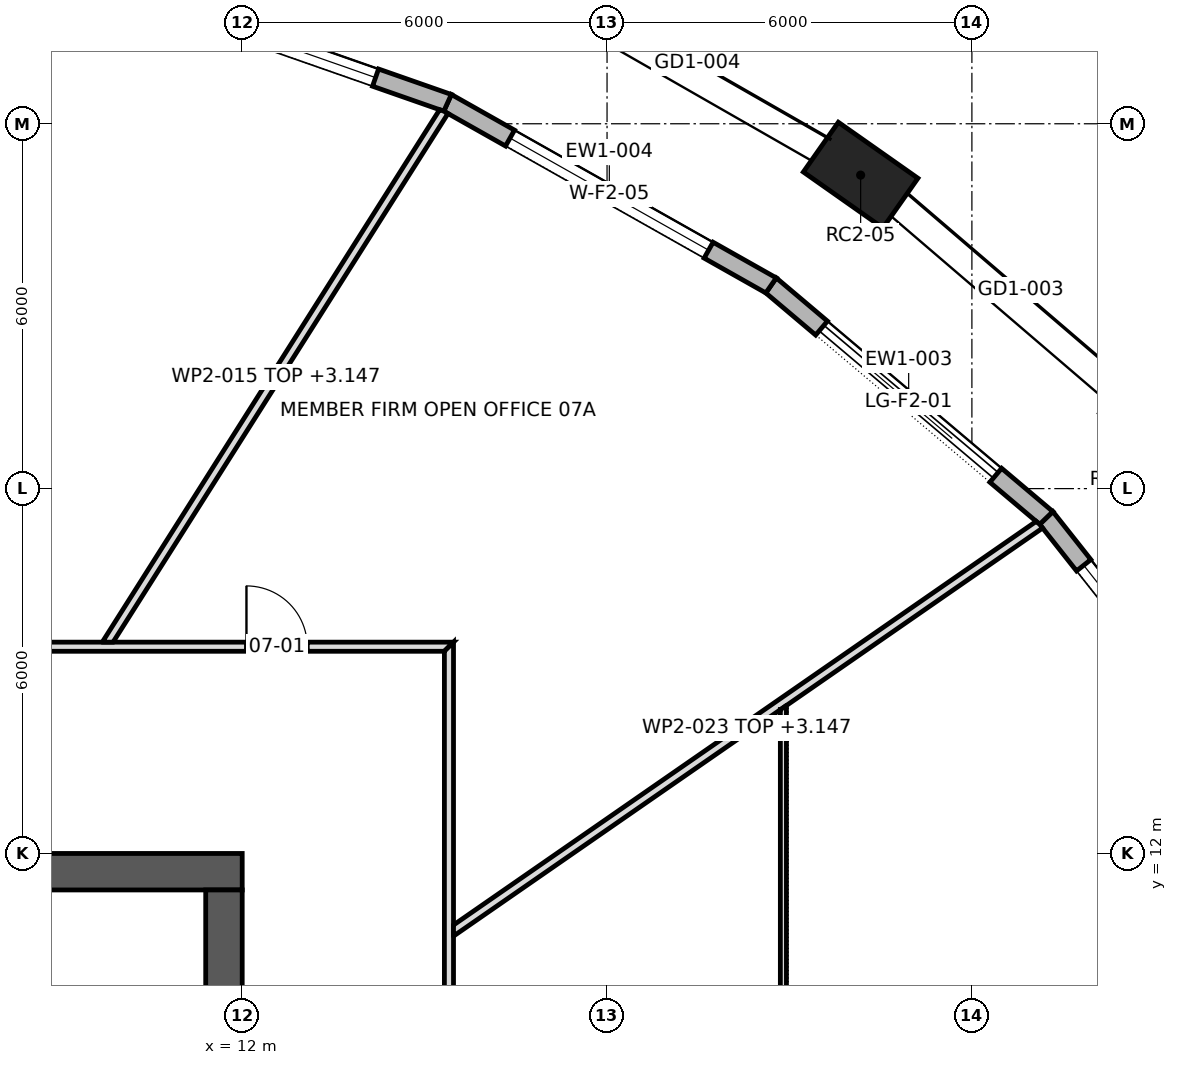
"""IFC4 building model, lengths in metres.
Left out: names, types, materials, properties, quantities, classifications, styles, units other than length and angle.
Written with IfcOpenShell. Run it as: python <this file> out.ifc"""

import sys

from ifc_helpers import new_model, si_unit, direction, frame, frame_2d, origin, origin_2d, place, context, subcontext, project, spatial, polyline, rectangle, outline, extrude, element, fill, save


model = new_model("IFC4")
c1 = context("Model", 3, precision=1e-05, world=origin(), true_north=direction((0.0, 1.0)))
c2 = subcontext(c1, "Body", "Model", "MODEL_VIEW")
j1 = project(units=[si_unit("LENGTHUNIT", "METRE"), si_unit("PLANEANGLEUNIT", "RADIAN")], contexts=[c1])
p1 = place(None, origin())
s1 = spatial("IfcSite", under=j1, at=p1, CompositionType="ELEMENT")
p2 = place(p1, origin())
s2 = spatial("IfcBuilding", under=s1, at=p2, CompositionType="ELEMENT")
p3 = place(p2, frame((0.0, 0.0, 112.9)))
s3 = spatial("IfcBuildingStorey", under=s2, at=p3, CompositionType="ELEMENT", Elevation=112.9)
p4 = place(p3, frame((22.17, 23.156, 0.0), z_axis=(0.0, 0.0, 1.0), x_axis=(-0.817906779671, 0.575350762377, 0.0)))
e1 = element("IfcColumn", 1, at=p4, inside=s3, PredefinedType="COLUMN", context=c2, shape_type="SweptSolid", body=[
    extrude(rectangle(XDim=1.6, YDim=1.0, at=origin_2d()), origin(), (0.0, 0.0, 1.0), 4.2),
])
p5 = place(p3, frame((-12.0, 11.7, 0.0), z_axis=(0.0, 0.0, 1.0), x_axis=(1.0, 0.0, 0.0)))
e2 = element("IfcWall", 2, at=p5, inside=s3, PredefinedType="SHEAR", context=c2, shape_type="SweptSolid", body=[
    extrude(rectangle(XDim=24.0, YDim=0.6, at=frame_2d((12.0, 0.0))), origin(), (0.0, 0.0, 1.0), 4.2),
])
p6 = place(p5, frame((9.975, 0.0, 0.0)))
e3 = element("IfcOpeningElement", 3, at=p6, cuts=e2, PredefinedType="OPENING", context=c2, shape_type="SweptSolid", body=[
    extrude(rectangle(XDim=0.9, YDim=2.1, at=frame_2d((0.45, 1.05))), frame((0.0, 0.312, 0.0), z_axis=(0.0, -1.0, 0.0), x_axis=(1.0, 0.0, 0.0)), (0.0, 0.0, 1.0), 0.624),
])
p7 = place(p5, frame((3.6, 0.0, 0.0)))
e4 = element("IfcOpeningElement", 4, at=p7, cuts=e2, PredefinedType="OPENING", context=c2, shape_type="SweptSolid", body=[
    extrude(rectangle(XDim=0.8, YDim=2.1, at=frame_2d((0.4, 1.05))), frame((0.0, 0.312, 0.0), z_axis=(0.0, -1.0, 0.0), x_axis=(1.0, 0.0, 0.0)), (0.0, 0.0, 1.0), 0.624),
])
p8 = place(p5, frame((6.2, 0.0, 0.0)))
e5 = element("IfcOpeningElement", 5, at=p8, cuts=e2, PredefinedType="OPENING", context=c2, shape_type="SweptSolid", body=[
    extrude(rectangle(XDim=0.8, YDim=2.1, at=frame_2d((0.4, 1.05))), frame((0.0, 0.312, 0.0), z_axis=(0.0, -1.0, 0.0), x_axis=(1.0, 0.0, 0.0)), (0.0, 0.0, 1.0), 0.624),
])
p9 = place(p5, frame((15.85, 0.0, 0.0)))
e6 = element("IfcOpeningElement", 6, at=p9, cuts=e2, PredefinedType="OPENING", context=c2, shape_type="SweptSolid", body=[
    extrude(rectangle(XDim=0.8, YDim=2.1, at=frame_2d((0.4, 1.05))), frame((0.0, 0.312, 0.0), z_axis=(0.0, -1.0, 0.0), x_axis=(1.0, 0.0, 0.0)), (0.0, 0.0, 1.0), 0.624),
])
p10 = place(p3, frame((11.7, -11.4, 0.0), z_axis=(0.0, 0.0, 1.0), x_axis=(0.0, 1.0, 0.0)))
e7 = element("IfcWall", 7, at=p10, inside=s3, PredefinedType="SHEAR", context=c2, shape_type="SweptSolid", body=[
    extrude(rectangle(XDim=22.8, YDim=0.6, at=frame_2d((11.4, 0.0))), origin(), (0.0, 0.0, 1.0), 4.2),
])
p11 = place(p10, frame((10.2, 0.0, 0.0)))
e8 = element("IfcOpeningElement", 8, at=p11, cuts=e7, PredefinedType="OPENING", context=c2, shape_type="SweptSolid", body=[
    extrude(rectangle(XDim=2.4, YDim=2.1, at=frame_2d((1.2, 1.05))), frame((0.0, 0.312, 0.0), z_axis=(0.0, -1.0, 0.0), x_axis=(1.0, 0.0, 0.0)), (0.0, 0.0, 1.0), 0.624),
])
p12 = place(p10, frame((19.5, 0.0, 0.0)))
e9 = element("IfcOpeningElement", 9, at=p12, cuts=e7, PredefinedType="OPENING", context=c2, shape_type="SweptSolid", body=[
    extrude(rectangle(XDim=1.2, YDim=2.1, at=frame_2d((0.6, 1.05))), frame((0.0, 0.312, 0.0), z_axis=(0.0, -1.0, 0.0), x_axis=(1.0, 0.0, 0.0)), (0.0, 0.0, 1.0), 0.624),
])
p13 = place(p10, frame((2.1, 0.0, 0.0)))
e10 = element("IfcOpeningElement", 10, at=p13, cuts=e7, PredefinedType="OPENING", context=c2, shape_type="SweptSolid", body=[
    extrude(rectangle(XDim=1.2, YDim=2.1, at=frame_2d((0.6, 1.05))), frame((0.0, 0.312, 0.0), z_axis=(0.0, -1.0, 0.0), x_axis=(1.0, 0.0, 0.0)), (0.0, 0.0, 1.0), 0.624),
])
p14 = place(p3, frame((28.781, 13.019, 0.0), z_axis=(0.0, 0.0, 1.0), x_axis=(-0.620329992039, 0.784340934146, 0.0)))
e11 = element("IfcWall", 11, at=p14, inside=s3, PredefinedType="STANDARD", context=c2, shape_type="SweptSolid", body=[
    extrude(outline(polyline([(-0.016, -0.15), (5.75, -0.15), (5.72, 0.15), (0.016, 0.15), (-0.016, -0.15)])), origin(), (0.0, 0.0, 1.0), 3.9),
])
p15 = place(p14, frame((0.993, 0.0, 0.6)))
e12 = element("IfcOpeningElement", 12, at=p15, cuts=e11, PredefinedType="OPENING", context=c2, shape_type="SweptSolid", body=[
    extrude(rectangle(XDim=3.75, YDim=2.85, at=frame_2d((1.875, 1.425))), frame((0.0, 0.162, 0.0), z_axis=(0.0, -1.0, 0.0), x_axis=(1.0, 0.0, 0.0)), (0.0, 0.0, 1.0), 0.324),
])
p16 = place(p3, frame((25.223, 17.518, 0.0), z_axis=(0.0, 0.0, 1.0), x_axis=(-0.763894031266, 0.645341699409, 0.0)))
e13 = element("IfcWall", 13, at=p16, inside=s3, PredefinedType="STANDARD", context=c2, shape_type="SweptSolid", body=[
    extrude(outline(polyline([(-0.015, -0.15), (5.939, -0.15), (5.911, 0.15), (0.015, 0.15), (-0.015, -0.15)])), origin(), (0.0, 0.0, 1.0), 3.9),
])
p17 = place(p16, frame((1.087, 0.0, 0.0)))
e14 = element("IfcOpeningElement", 14, at=p17, cuts=e13, PredefinedType="OPENING", context=c2, shape_type="SweptSolid", body=[
    extrude(rectangle(XDim=3.75, YDim=3.45, at=frame_2d((1.875, 1.725))), frame((0.0, 0.162, 0.0), z_axis=(0.0, -1.0, 0.0), x_axis=(1.0, 0.0, 0.0)), (0.0, 0.0, 1.0), 0.324),
])
p18 = place(p3, frame((20.697, 21.341, 0.0), z_axis=(0.0, 0.0, 1.0), x_axis=(-0.870828448417, 0.491587035455, 0.0)))
e15 = element("IfcWall", 15, at=p18, inside=s3, PredefinedType="STANDARD", context=c2, shape_type="SweptSolid", body=[
    extrude(outline(polyline([(-0.014, -0.15), (6.122, -0.15), (6.095, 0.15), (0.014, 0.15), (-0.014, -0.15)])), origin(), (0.0, 0.0, 1.0), 3.9),
])
p19 = place(p18, frame((1.179, 0.0, 0.6)))
e16 = element("IfcOpeningElement", 16, at=p19, cuts=e15, PredefinedType="OPENING", context=c2, shape_type="SweptSolid", body=[
    extrude(rectangle(XDim=3.75, YDim=2.85, at=frame_2d((1.875, 1.425))), frame((0.0, 0.162, 0.0), z_axis=(0.0, -1.0, 0.0), x_axis=(1.0, 0.0, 0.0)), (0.0, 0.0, 1.0), 0.324),
])
p20 = place(p3, frame((15.377, 24.344, 0.0), z_axis=(0.0, 0.0, 1.0), x_axis=(-0.943866868202, 0.330326104193, 0.0)))
e17 = element("IfcWall", 17, at=p20, inside=s3, PredefinedType="STANDARD", context=c2, shape_type="SweptSolid", body=[
    extrude(outline(polyline([(-0.013, -0.15), (6.273, -0.15), (6.247, 0.15), (0.013, 0.15), (-0.013, -0.15)])), origin(), (0.0, 0.0, 1.0), 3.9),
])
p21 = place(p20, frame((1.255, 0.0, 0.6)))
e18 = element("IfcOpeningElement", 18, at=p21, cuts=e17, PredefinedType="OPENING", context=c2, shape_type="SweptSolid", body=[
    extrude(rectangle(XDim=3.75, YDim=2.85, at=frame_2d((1.875, 1.425))), frame((0.0, 0.162, 0.0), z_axis=(0.0, -1.0, 0.0), x_axis=(1.0, 0.0, 0.0)), (0.0, 0.0, 1.0), 0.324),
])
p22 = place(p3, frame((-15.475, 15.4, 0.0), z_axis=(0.0, 0.0, 1.0), x_axis=(1.0, 0.0, 0.0)))
e19 = element("IfcWall", 19, at=p22, inside=s3, PredefinedType="PARTITIONING", context=c2, shape_type="SweptSolid", body=[
    extrude(outline(polyline([(0.15, -0.075), (2.066, -0.075), (3.981, -0.075), (5.897, -0.075), (7.812, -0.075), (9.728, -0.075), (11.644, -0.075), (13.56, -0.075), (15.475, -0.075), (17.391, -0.075), (19.306, -0.075), (21.222, -0.075), (23.138, -0.075), (25.053, -0.075), (26.969, -0.075), (28.885, -0.075), (30.8, -0.075), (30.95, 0.075), (29.016, 0.075), (27.081, 0.075), (25.147, 0.075), (23.212, 0.075), (21.278, 0.075), (19.344, 0.075), (17.409, 0.075), (15.475, 0.075), (13.541, 0.075), (11.606, 0.075), (9.672, 0.075), (7.738, 0.075), (5.803, 0.075), (3.869, 0.075), (1.935, 0.075), (0.0, 0.075), (0.15, -0.075)])), origin(), (0.0, 0.0, 1.0), 3.9),
])
p23 = place(p22, frame((27.545, 0.0, 0.0)))
e20 = element("IfcOpeningElement", 20, at=p23, cuts=e19, PredefinedType="OPENING", context=c2, shape_type="SweptSolid", body=[
    extrude(rectangle(XDim=1.0, YDim=2.1, at=frame_2d((0.5, 1.05))), frame((0.0, 0.087, 0.0), z_axis=(0.0, -1.0, 0.0), x_axis=(1.0, 0.0, 0.0)), (0.0, 0.0, 1.0), 0.174),
])
p24 = place(p22, frame((18.545, 0.0, 0.0)))
e21 = element("IfcOpeningElement", 21, at=p24, cuts=e19, PredefinedType="OPENING", context=c2, shape_type="SweptSolid", body=[
    extrude(rectangle(XDim=1.8, YDim=2.1, at=frame_2d((0.9, 1.05))), frame((0.0, 0.087, 0.0), z_axis=(0.0, -1.0, 0.0), x_axis=(1.0, 0.0, 0.0)), (0.0, 0.0, 1.0), 0.174),
])
p25 = place(p22, frame((6.195, 0.0, 0.0)))
e22 = element("IfcOpeningElement", 22, at=p25, cuts=e19, PredefinedType="OPENING", context=c2, shape_type="SweptSolid", body=[
    extrude(rectangle(XDim=1.8, YDim=2.1, at=frame_2d((0.9, 1.05))), frame((0.0, 0.087, 0.0), z_axis=(0.0, -1.0, 0.0), x_axis=(1.0, 0.0, 0.0)), (0.0, 0.0, 1.0), 0.174),
])
p26 = place(p3, frame((9.762, 15.435, 0.0), z_axis=(0.0, 0.0, 1.0), x_axis=(0.535189090909, 0.844732287161, 0.0)))
e23 = element("IfcWall", 23, at=p26, inside=s3, PredefinedType="PARTITIONING", context=c2, shape_type="SweptSolid", body=[
    extrude(outline(polyline([(10.386, -0.075), (10.386, -0.069), (10.382, 0.004), (10.365, 0.075), (8.638, 0.075), (6.91, 0.075), (5.183, 0.075), (3.455, 0.075), (1.728, 0.075), (0.0, 0.075), (0.0, 0.075), (0.095, -0.075), (1.81, -0.075), (3.525, -0.075), (5.24, -0.075), (6.955, -0.075), (8.671, -0.075), (10.386, -0.075)])), origin(), (0.0, 0.0, 1.0), 3.147),
])
p27 = place(p3, frame((15.4, 2.88, 0.0), z_axis=(0.0, 0.0, 1.0), x_axis=(0.0, 1.0, 0.0)))
e24 = element("IfcWall", 24, at=p27, inside=s3, PredefinedType="PARTITIONING", context=c2, shape_type="SweptSolid", body=[
    extrude(outline(polyline([(0.0, -0.075), (1.799, -0.075), (3.599, -0.075), (5.398, -0.075), (7.197, -0.075), (8.996, -0.075), (10.796, -0.075), (12.595, -0.075), (12.445, 0.075), (10.667, 0.075), (8.889, 0.075), (7.112, 0.075), (5.333, 0.075), (3.556, 0.075), (1.778, 0.075), (0.0, 0.075), (0.0, -0.075)])), origin(), (0.0, 0.0, 1.0), 3.9),
])
p28 = place(p27, frame((3.4, 0.0, 0.0)))
e25 = element("IfcOpeningElement", 25, at=p28, cuts=e24, PredefinedType="OPENING", context=c2, shape_type="SweptSolid", body=[
    extrude(rectangle(XDim=1.0, YDim=2.1, at=frame_2d((0.5, 1.05))), frame((0.0, 0.087, 0.0), z_axis=(0.0, -1.0, 0.0), x_axis=(1.0, 0.0, 0.0)), (0.0, 0.0, 1.0), 0.174),
])
p29 = place(p3, frame((15.433, 10.702, 0.0), z_axis=(0.0, 0.0, 1.0), x_axis=(0.82202509952, 0.569451258458, 0.0)))
e26 = element("IfcWall", 26, at=p29, inside=s3, PredefinedType="PARTITIONING", context=c2, shape_type="SweptSolid", body=[
    extrude(outline(polyline([(0.0, -0.075), (1.635, -0.075), (3.269, -0.075), (4.904, -0.075), (6.538, -0.075), (6.54, -0.072), (6.544, -0.075), (8.291, -0.075), (10.038, -0.075), (11.785, -0.075), (11.785, -0.071), (11.78, 0.003), (11.761, 0.075), (9.818, 0.075), (7.875, 0.075), (5.932, 0.075), (3.989, 0.075), (2.046, 0.075), (0.104, 0.075), (0.0, -0.074), (0.0, -0.075)])), origin(), (0.0, 0.0, 1.0), 3.147),
])
p30 = place(p3, frame((20.9, -1.668, 0.0), z_axis=(0.0, 0.0, 1.0), x_axis=(0.0, 1.0, 0.0)))
e27 = element("IfcWall", 27, at=p30, inside=s3, PredefinedType="PARTITIONING", context=c2, shape_type="SweptSolid", body=[
    extrude(outline(polyline([(16.102, -0.05), (16.102, -0.05), (16.032, 0.05), (14.127, 0.05), (12.221, 0.05), (10.315, 0.05), (8.41, 0.05), (6.504, 0.05), (4.598, 0.05), (4.598, 0.05), (4.499, 0.05), (4.499, 0.05), (3.002, 0.05), (1.505, 0.05), (0.008, 0.05), (0.0, -0.049), (0.0, -0.05), (1.789, -0.05), (3.578, -0.05), (5.367, -0.05), (7.156, -0.05), (8.945, -0.05), (10.734, -0.05), (12.523, -0.05), (14.312, -0.05), (16.102, -0.05)])), origin(), (0.0, 0.0, 1.0), 3.9),
])
p31 = place(p30, frame((9.904, 0.0, 0.0)))
e28 = element("IfcOpeningElement", 28, at=p31, cuts=e27, PredefinedType="OPENING", context=c2, shape_type="SweptSolid", body=[
    extrude(rectangle(XDim=0.9, YDim=2.1, at=frame_2d((0.45, 1.05))), frame((0.0, 0.062, 0.0), z_axis=(0.0, -1.0, 0.0), x_axis=(1.0, 0.0, 0.0)), (0.0, 0.0, 1.0), 0.124),
])
p32 = place(p15, origin())
e29 = element("IfcWindow", 29, at=p32, inside=s3, PartitioningType="TRIPLE_PANEL_VERTICAL", PredefinedType="WINDOW", context=c2, shape_type="SweptSolid", body=[
    extrude(rectangle(XDim=3.75, YDim=2.85, at=frame_2d((1.875, 1.425))), frame((0.0, 0.03, 0.0), z_axis=(0.0, -1.0, 0.0), x_axis=(1.0, 0.0, 0.0)), (0.0, 0.0, 1.0), 0.06),
])
fill(e12, e29)
p33 = place(p17, origin())
e30 = element("IfcDoor", 30, at=p33, inside=s3, OperationType="DOUBLE_DOOR_SLIDING", PredefinedType="DOOR", context=c2, shape_type="SweptSolid", body=[
    extrude(rectangle(XDim=3.75, YDim=3.45, at=frame_2d((1.875, 1.725))), frame((0.0, 0.025, 0.0), z_axis=(0.0, -1.0, 0.0), x_axis=(1.0, 0.0, 0.0)), (0.0, 0.0, 1.0), 0.05),
])
fill(e14, e30)
p34 = place(p19, origin())
e31 = element("IfcWindow", 31, at=p34, inside=s3, PartitioningType="TRIPLE_PANEL_VERTICAL", PredefinedType="WINDOW", context=c2, shape_type="SweptSolid", body=[
    extrude(rectangle(XDim=3.75, YDim=2.85, at=frame_2d((1.875, 1.425))), frame((0.0, 0.03, 0.0), z_axis=(0.0, -1.0, 0.0), x_axis=(1.0, 0.0, 0.0)), (0.0, 0.0, 1.0), 0.06),
])
fill(e16, e31)
p35 = place(p21, origin())
e32 = element("IfcWindow", 32, at=p35, inside=s3, PartitioningType="TRIPLE_PANEL_VERTICAL", PredefinedType="WINDOW", context=c2, shape_type="SweptSolid", body=[
    extrude(rectangle(XDim=3.75, YDim=2.85, at=frame_2d((1.875, 1.425))), frame((0.0, 0.03, 0.0), z_axis=(0.0, -1.0, 0.0), x_axis=(1.0, 0.0, 0.0)), (0.0, 0.0, 1.0), 0.06),
])
fill(e18, e32)
p36 = place(p23, origin())
e33 = element("IfcDoor", 33, at=p36, inside=s3, OperationType="SINGLE_SWING_RIGHT", PredefinedType="DOOR", context=c2, shape_type="SweptSolid", body=[
    extrude(rectangle(XDim=1.0, YDim=2.1, at=frame_2d((0.5, 1.05))), frame((0.0, 0.025, 0.0), z_axis=(0.0, -1.0, 0.0), x_axis=(1.0, 0.0, 0.0)), (0.0, 0.0, 1.0), 0.05),
])
fill(e20, e33)
save(model, sys.argv[1])
